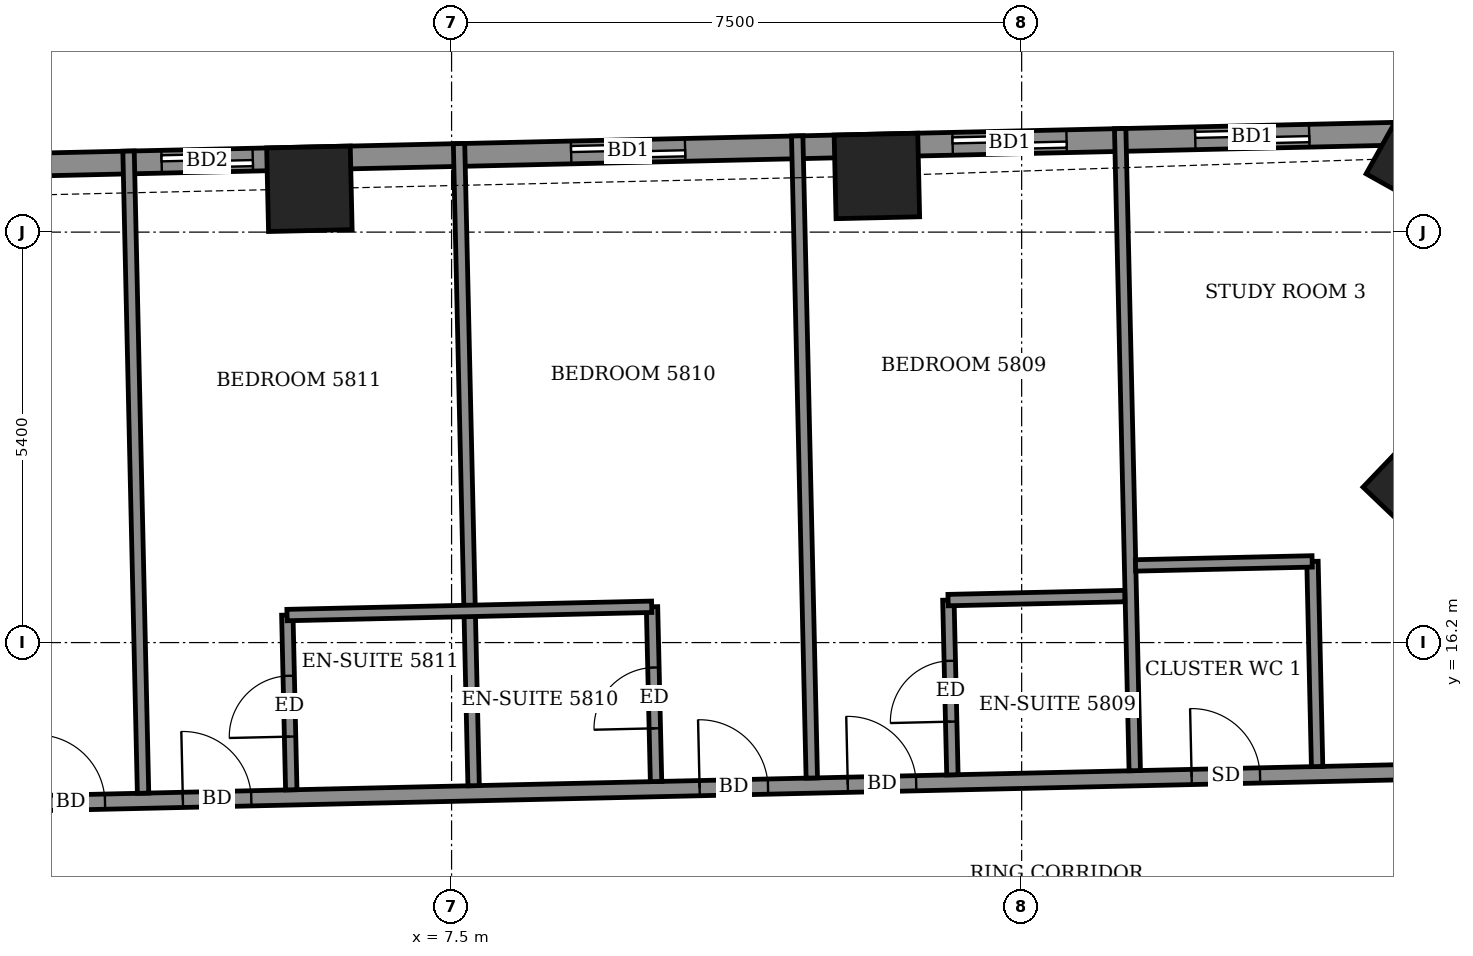
"""IFC4 building model, lengths in metres.
Left out: names, types, materials, properties, quantities, classifications, styles, units other than length and angle.
Written with IfcOpenShell. Run it as: python <this file> out.ifc"""

import sys

from ifc_helpers import new_model, si_unit, direction, frame, frame_2d, origin, origin_2d, place, context, subcontext, project, spatial, rectangle, extrude, element, fill, save


model = new_model("IFC4")
c1 = context("Model", 3, precision=1e-05, world=origin(), true_north=direction((0.0, 1.0)))
c2 = subcontext(c1, "Body", "Model", "MODEL_VIEW")
j1 = project(units=[si_unit("LENGTHUNIT", "METRE"), si_unit("PLANEANGLEUNIT", "RADIAN")], contexts=[c1])
p1 = place(None, origin())
s1 = spatial("IfcSite", under=j1, at=p1, CompositionType="ELEMENT")
p2 = place(p1, origin())
s2 = spatial("IfcBuilding", under=s1, at=p2, CompositionType="ELEMENT")
p3 = place(p2, frame((0.0, 0.0, 231.1)))
s3 = spatial("IfcBuildingStorey", under=s2, at=p3, CompositionType="ELEMENT", Elevation=231.1)
for number, where, z_axis, x_axis in (
    (1, (20.269, 18.262, -0.55), (0.0, 0.0, 1.0), (-0.723, 0.691, 0.0)),
    (2, (20.281, 22.579, -0.55), (0.0, 0.0, 1.0), (-0.873, 0.488, 0.0)),
    (3, (13.095, 22.339, -0.55), (0.0, 0.0, 1.0), (-1.0, -0.023, 0.0)),
    (4, (5.629, 22.17, -0.55), (0.0, 0.0, 1.0), (-1.0, -0.023, 0.0)),
):
    element("IfcColumn", number, at=place(p3, frame(where, z_axis=z_axis, x_axis=x_axis)), inside=s3, PredefinedType="COLUMN", context=c2, shape_type="SweptSolid", body=[
        extrude(rectangle(XDim=1.1, YDim=1.1, at=origin_2d()), origin(), (0.0, 0.0, 1.0), 3.6),
    ])
p4 = place(p3, frame((20.403, 22.905, 0.0), z_axis=(0.0, 0.0, 1.0), x_axis=(-0.99974298964, -0.022670568288, 0.0)))
e5 = element("IfcWall", 5, at=p4, inside=s3, PredefinedType="SOLIDWALL", context=c2, shape_type="SweptSolid", body=[
    extrude(rectangle(XDim=44.509, YDim=0.3, at=frame_2d((22.254, 0.0))), origin(), (0.0, 0.0, 1.0), 2.55),
])
p5 = place(p4, frame((1.62, 0.0, 0.0)))
e6 = element("IfcOpeningElement", 6, at=p5, cuts=e5, PredefinedType="OPENING", context=c2, shape_type="SweptSolid", body=[
    extrude(rectangle(XDim=1.5, YDim=2.4, at=frame_2d((0.75, 1.2))), frame((0.0, 0.16, 0.0), z_axis=(0.0, -1.0, 0.0), x_axis=(1.0, 0.0, 0.0)), (0.0, 0.0, 1.0), 0.32),
])
p6 = place(p4, frame((4.813, 0.0, 0.0)))
e7 = element("IfcOpeningElement", 7, at=p6, cuts=e5, PredefinedType="OPENING", context=c2, shape_type="SweptSolid", body=[
    extrude(rectangle(XDim=1.5, YDim=2.4, at=frame_2d((0.75, 1.2))), frame((0.0, 0.16, 0.0), z_axis=(0.0, -1.0, 0.0), x_axis=(1.0, 0.0, 0.0)), (0.0, 0.0, 1.0), 0.32),
])
p7 = place(p4, frame((9.833, 0.0, 0.0)))
e8 = element("IfcOpeningElement", 8, at=p7, cuts=e5, PredefinedType="OPENING", context=c2, shape_type="SweptSolid", body=[
    extrude(rectangle(XDim=1.5, YDim=2.4, at=frame_2d((0.75, 1.2))), frame((0.0, 0.16, 0.0), z_axis=(0.0, -1.0, 0.0), x_axis=(1.0, 0.0, 0.0)), (0.0, 0.0, 1.0), 0.32),
])
p8 = place(p4, frame((15.522, 0.0, 0.0)))
e9 = element("IfcOpeningElement", 9, at=p8, cuts=e5, PredefinedType="OPENING", context=c2, shape_type="SweptSolid", body=[
    extrude(rectangle(XDim=1.2, YDim=2.4, at=frame_2d((0.6, 1.2))), frame((0.0, 0.16, 0.0), z_axis=(0.0, -1.0, 0.0), x_axis=(1.0, 0.0, 0.0)), (0.0, 0.0, 1.0), 0.32),
])
p9 = place(p4, frame((18.558, 0.0, 0.0)))
e10 = element("IfcOpeningElement", 10, at=p9, cuts=e5, PredefinedType="OPENING", context=c2, shape_type="SweptSolid", body=[
    extrude(rectangle(XDim=1.5, YDim=2.4, at=frame_2d((0.75, 1.2))), frame((0.0, 0.16, 0.0), z_axis=(0.0, -1.0, 0.0), x_axis=(1.0, 0.0, 0.0)), (0.0, 0.0, 1.0), 0.32),
])
p10 = place(p4, frame((23.456, 0.0, 0.0)))
e11 = element("IfcOpeningElement", 11, at=p10, cuts=e5, PredefinedType="OPENING", context=c2, shape_type="SweptSolid", body=[
    extrude(rectangle(XDim=1.5, YDim=2.4, at=frame_2d((0.75, 1.2))), frame((0.0, 0.16, 0.0), z_axis=(0.0, -1.0, 0.0), x_axis=(1.0, 0.0, 0.0)), (0.0, 0.0, 1.0), 0.32),
])
p11 = place(p4, frame((26.89, 0.0, 0.0)))
e12 = element("IfcOpeningElement", 12, at=p11, cuts=e5, PredefinedType="OPENING", context=c2, shape_type="SweptSolid", body=[
    extrude(rectangle(XDim=1.5, YDim=2.4, at=frame_2d((0.75, 1.2))), frame((0.0, 0.16, 0.0), z_axis=(0.0, -1.0, 0.0), x_axis=(1.0, 0.0, 0.0)), (0.0, 0.0, 1.0), 0.32),
])
p12 = place(p4, frame((31.708, 0.0, 0.0)))
e13 = element("IfcOpeningElement", 13, at=p12, cuts=e5, PredefinedType="OPENING", context=c2, shape_type="SweptSolid", body=[
    extrude(rectangle(XDim=1.5, YDim=2.4, at=frame_2d((0.75, 1.2))), frame((0.0, 0.16, 0.0), z_axis=(0.0, -1.0, 0.0), x_axis=(1.0, 0.0, 0.0)), (0.0, 0.0, 1.0), 0.32),
])
p13 = place(p4, frame((35.024, 0.0, 0.0)))
e14 = element("IfcOpeningElement", 14, at=p13, cuts=e5, PredefinedType="OPENING", context=c2, shape_type="SweptSolid", body=[
    extrude(rectangle(XDim=1.5, YDim=2.4, at=frame_2d((0.75, 1.2))), frame((0.0, 0.16, 0.0), z_axis=(0.0, -1.0, 0.0), x_axis=(1.0, 0.0, 0.0)), (0.0, 0.0, 1.0), 0.32),
])
p14 = place(p4, frame((40.173, 0.0, 0.9)))
e15 = element("IfcOpeningElement", 15, at=p14, cuts=e5, PredefinedType="OPENING", context=c2, shape_type="SweptSolid", body=[
    extrude(rectangle(XDim=2.4, YDim=1.5, at=frame_2d((1.2, 0.75))), frame((0.0, 0.16, 0.0), z_axis=(0.0, -1.0, 0.0), x_axis=(1.0, 0.0, 0.0)), (0.0, 0.0, 1.0), 0.32),
])
p15 = place(p3, frame((16.679, 12.918, 0.0), z_axis=(0.0, 0.0, 1.0), x_axis=(0.99974139269, 0.022740882632, 0.0)))
e16 = element("IfcWall", 16, at=p15, inside=s3, PredefinedType="PARTITIONING", context=c2, shape_type="SweptSolid", body=[
    extrude(rectangle(XDim=6.549, YDim=0.2, at=frame_2d((3.274, 0.0))), origin(), (0.0, 0.0, 1.0), 3.05),
])
p16 = place(p15, frame((3.75, 0.0, 0.0)))
e17 = element("IfcOpeningElement", 17, at=p16, cuts=e16, PredefinedType="OPENING", context=c2, shape_type="SweptSolid", body=[
    extrude(rectangle(XDim=1.0, YDim=2.1, at=frame_2d((0.5, 1.05))), frame((0.0, 0.11, 0.0), z_axis=(0.0, -1.0, 0.0), x_axis=(1.0, 0.0, 0.0)), (0.0, 0.0, 1.0), 0.22),
])
p17 = place(p3, frame((-27.652, 13.413, 0.0), z_axis=(0.0, 0.0, 1.0), x_axis=(0.999742610679, 0.022687273792, 0.0)))
e18 = element("IfcWall", 18, at=p17, inside=s3, PredefinedType="PARTITIONING", context=c2, shape_type="SweptSolid", body=[
    extrude(rectangle(XDim=50.857, YDim=0.2, at=frame_2d((25.429, 0.0))), origin(), (0.0, 0.0, 1.0), 3.05),
])
p18 = place(p17, frame((49.179, 0.0, 0.0)))
e19 = element("IfcOpeningElement", 19, at=p18, cuts=e18, PredefinedType="OPENING", context=c2, shape_type="SweptSolid", body=[
    extrude(rectangle(XDim=1.0, YDim=2.1, at=frame_2d((0.5, 1.05))), frame((0.0, 0.11, 0.0), z_axis=(0.0, -1.0, 0.0), x_axis=(1.0, 0.0, 0.0)), (0.0, 0.0, 1.0), 0.22),
])
p19 = place(p17, frame((44.9, 0.0, 0.0)))
e20 = element("IfcOpeningElement", 20, at=p19, cuts=e18, PredefinedType="OPENING", context=c2, shape_type="SweptSolid", body=[
    extrude(rectangle(XDim=0.9, YDim=2.1, at=frame_2d((0.45, 1.05))), frame((0.0, 0.11, 0.0), z_axis=(0.0, -1.0, 0.0), x_axis=(1.0, 0.0, 0.0)), (0.0, 0.0, 1.0), 0.22),
])
p20 = place(p17, frame((40.375, 0.0, 0.0)))
e21 = element("IfcOpeningElement", 21, at=p20, cuts=e18, PredefinedType="OPENING", context=c2, shape_type="SweptSolid", body=[
    extrude(rectangle(XDim=0.9, YDim=2.1, at=frame_2d((0.45, 1.05))), frame((0.0, 0.11, 0.0), z_axis=(0.0, -1.0, 0.0), x_axis=(1.0, 0.0, 0.0)), (0.0, 0.0, 1.0), 0.22),
])
p21 = place(p17, frame((38.425, 0.0, 0.0)))
e22 = element("IfcOpeningElement", 22, at=p21, cuts=e18, PredefinedType="OPENING", context=c2, shape_type="SweptSolid", body=[
    extrude(rectangle(XDim=0.9, YDim=2.1, at=frame_2d((0.45, 1.05))), frame((0.0, 0.11, 0.0), z_axis=(0.0, -1.0, 0.0), x_axis=(1.0, 0.0, 0.0)), (0.0, 0.0, 1.0), 0.22),
])
p22 = place(p17, frame((31.625, 0.0, 0.0)))
e23 = element("IfcOpeningElement", 23, at=p22, cuts=e18, PredefinedType="OPENING", context=c2, shape_type="SweptSolid", body=[
    extrude(rectangle(XDim=0.9, YDim=2.1, at=frame_2d((0.45, 1.05))), frame((0.0, 0.11, 0.0), z_axis=(0.0, -1.0, 0.0), x_axis=(1.0, 0.0, 0.0)), (0.0, 0.0, 1.0), 0.22),
])
p23 = place(p17, frame((29.7, 0.0, 0.0)))
e24 = element("IfcOpeningElement", 24, at=p23, cuts=e18, PredefinedType="OPENING", context=c2, shape_type="SweptSolid", body=[
    extrude(rectangle(XDim=0.9, YDim=2.1, at=frame_2d((0.45, 1.05))), frame((0.0, 0.11, 0.0), z_axis=(0.0, -1.0, 0.0), x_axis=(1.0, 0.0, 0.0)), (0.0, 0.0, 1.0), 0.22),
])
p24 = place(p17, frame((22.95, 0.0, 0.0)))
e25 = element("IfcOpeningElement", 25, at=p24, cuts=e18, PredefinedType="OPENING", context=c2, shape_type="SweptSolid", body=[
    extrude(rectangle(XDim=0.9, YDim=2.1, at=frame_2d((0.45, 1.05))), frame((0.0, 0.11, 0.0), z_axis=(0.0, -1.0, 0.0), x_axis=(1.0, 0.0, 0.0)), (0.0, 0.0, 1.0), 0.22),
])
p25 = place(p17, frame((20.95, 0.0, 0.0)))
e26 = element("IfcOpeningElement", 26, at=p25, cuts=e18, PredefinedType="OPENING", context=c2, shape_type="SweptSolid", body=[
    extrude(rectangle(XDim=0.9, YDim=2.1, at=frame_2d((0.45, 1.05))), frame((0.0, 0.11, 0.0), z_axis=(0.0, -1.0, 0.0), x_axis=(1.0, 0.0, 0.0)), (0.0, 0.0, 1.0), 0.22),
])
p26 = place(p17, frame((14.15, 0.0, 0.0)))
e27 = element("IfcOpeningElement", 27, at=p26, cuts=e18, PredefinedType="OPENING", context=c2, shape_type="SweptSolid", body=[
    extrude(rectangle(XDim=0.9, YDim=2.1, at=frame_2d((0.45, 1.05))), frame((0.0, 0.11, 0.0), z_axis=(0.0, -1.0, 0.0), x_axis=(1.0, 0.0, 0.0)), (0.0, 0.0, 1.0), 0.22),
])
p27 = place(p17, frame((12.2, 0.0, 0.0)))
e28 = element("IfcOpeningElement", 28, at=p27, cuts=e18, PredefinedType="OPENING", context=c2, shape_type="SweptSolid", body=[
    extrude(rectangle(XDim=0.9, YDim=2.1, at=frame_2d((0.45, 1.05))), frame((0.0, 0.11, 0.0), z_axis=(0.0, -1.0, 0.0), x_axis=(1.0, 0.0, 0.0)), (0.0, 0.0, 1.0), 0.22),
])
p28 = place(p17, frame((2.05, 0.0, 0.0)))
e29 = element("IfcOpeningElement", 29, at=p28, cuts=e18, PredefinedType="OPENING", context=c2, shape_type="SweptSolid", body=[
    extrude(rectangle(XDim=1.0, YDim=2.1, at=frame_2d((0.5, 1.05))), frame((0.0, 0.11, 0.0), z_axis=(0.0, -1.0, 0.0), x_axis=(1.0, 0.0, 0.0)), (0.0, 0.0, 1.0), 0.22),
])
p29 = place(p17, frame((7.45, 0.0, 0.0)))
e30 = element("IfcOpeningElement", 30, at=p29, cuts=e18, PredefinedType="OPENING", context=c2, shape_type="SweptSolid", body=[
    extrude(rectangle(XDim=0.9, YDim=2.1, at=frame_2d((0.45, 1.05))), frame((0.0, 0.11, 0.0), z_axis=(0.0, -1.0, 0.0), x_axis=(1.0, 0.0, 0.0)), (0.0, 0.0, 1.0), 0.22),
])
p30 = place(p3, frame((3.441, 14.218, 0.0), z_axis=(0.0, 0.0, 1.0), x_axis=(-0.022593427839, 0.999744735929, 0.0)))
e31 = element("IfcWall", 31, at=p30, inside=s3, PredefinedType="PARTITIONING", context=c2, shape_type="SweptSolid", body=[
    extrude(rectangle(XDim=8.45, YDim=0.15, at=frame_2d((4.225, 0.0))), origin(), (0.0, 0.0, 1.0), 2.5),
])
p31 = place(p3, frame((5.391, 14.263, 0.0), z_axis=(0.0, 0.0, 1.0), x_axis=(-0.022612884682, 0.999744296031, 0.0)))
e32 = element("IfcWall", 32, at=p31, inside=s3, PredefinedType="PARTITIONING", context=c2, shape_type="SweptSolid", body=[
    extrude(rectangle(XDim=2.3, YDim=0.15, at=frame_2d((1.15, 0.0))), origin(), (0.0, 0.0, 1.0), 3.05),
])
p32 = place(p31, frame((0.7, 0.0, 0.0)))
e33 = element("IfcOpeningElement", 33, at=p32, cuts=e32, PredefinedType="OPENING", context=c2, shape_type="SweptSolid", body=[
    extrude(rectangle(XDim=0.8, YDim=2.1, at=frame_2d((0.4, 1.05))), frame((0.0, 0.085, 0.0), z_axis=(0.0, -1.0, 0.0), x_axis=(1.0, 0.0, 0.0)), (0.0, 0.0, 1.0), 0.17),
])
p33 = place(p3, frame((7.79, 14.317, 0.0), z_axis=(0.0, 0.0, 1.0), x_axis=(-0.022737812646, 0.999741462517, 0.0)))
e34 = element("IfcWall", 34, at=p33, inside=s3, PredefinedType="PARTITIONING", context=c2, shape_type="SweptSolid", body=[
    extrude(rectangle(XDim=8.45, YDim=0.15, at=frame_2d((4.225, 0.0))), origin(), (0.0, 0.0, 1.0), 2.5),
])
p34 = place(p3, frame((10.19, 14.372, 0.0), z_axis=(0.0, 0.0, 1.0), x_axis=(-0.023039761813, 0.999734549456, 0.0)))
e35 = element("IfcWall", 35, at=p34, inside=s3, PredefinedType="PARTITIONING", context=c2, shape_type="SweptSolid", body=[
    extrude(rectangle(XDim=2.3, YDim=0.15, at=frame_2d((1.15, 0.0))), origin(), (0.0, 0.0, 1.0), 3.05),
])
p35 = place(p34, frame((0.7, 0.0, 0.0)))
e36 = element("IfcOpeningElement", 36, at=p35, cuts=e35, PredefinedType="OPENING", context=c2, shape_type="SweptSolid", body=[
    extrude(rectangle(XDim=0.8, YDim=2.1, at=frame_2d((0.4, 1.05))), frame((0.0, 0.085, 0.0), z_axis=(0.0, -1.0, 0.0), x_axis=(1.0, 0.0, 0.0)), (0.0, 0.0, 1.0), 0.17),
])
p36 = place(p3, frame((12.239, 14.418, 0.0), z_axis=(0.0, 0.0, 1.0), x_axis=(-0.022708935798, 0.999742118866, 0.0)))
e37 = element("IfcWall", 37, at=p36, inside=s3, PredefinedType="PARTITIONING", context=c2, shape_type="SweptSolid", body=[
    extrude(rectangle(XDim=8.45, YDim=0.15, at=frame_2d((4.225, 0.0))), origin(), (0.0, 0.0, 1.0), 2.5),
])
p37 = place(p3, frame((14.089, 14.46, 0.0), z_axis=(0.0, 0.0, 1.0), x_axis=(-0.023143422514, 0.999732155127, 0.0)))
e38 = element("IfcWall", 38, at=p37, inside=s3, PredefinedType="PARTITIONING", context=c2, shape_type="SweptSolid", body=[
    extrude(rectangle(XDim=2.3, YDim=0.15, at=frame_2d((1.15, 0.0))), origin(), (0.0, 0.0, 1.0), 3.05),
])
p38 = place(p37, frame((0.7, 0.0, 0.0)))
e39 = element("IfcOpeningElement", 39, at=p38, cuts=e38, PredefinedType="OPENING", context=c2, shape_type="SweptSolid", body=[
    extrude(rectangle(XDim=0.8, YDim=2.1, at=frame_2d((0.4, 1.05))), frame((0.0, 0.085, 0.0), z_axis=(0.0, -1.0, 0.0), x_axis=(1.0, 0.0, 0.0)), (0.0, 0.0, 1.0), 0.17),
])
p39 = place(p3, frame((16.488, 14.515, 0.0), z_axis=(0.0, 0.0, 1.0), x_axis=(-0.022740440012, 0.999741402758, 0.0)))
e40 = element("IfcWall", 40, at=p39, inside=s3, PredefinedType="PARTITIONING", context=c2, shape_type="SweptSolid", body=[
    extrude(rectangle(XDim=8.449, YDim=0.15, at=frame_2d((4.225, 0.0))), origin(), (0.0, 0.0, 1.0), 2.55),
])
p40 = place(p3, frame((18.887, 14.569, 0.0), z_axis=(0.0, 0.0, 1.0), x_axis=(-0.02260842146, 0.999744396973, 0.0)))
e41 = element("IfcWall", 41, at=p40, inside=s3, PredefinedType="PARTITIONING", context=c2, shape_type="SweptSolid", body=[
    extrude(rectangle(XDim=2.7, YDim=0.15, at=frame_2d((1.35, 0.0))), origin(), (0.0, 0.0, 1.0), 3.05),
])
p41 = place(p3, frame((5.335, 16.562, 0.0), z_axis=(0.0, 0.0, 1.0), x_axis=(0.999742596585, 0.02268789488, 0.0)))
e42 = element("IfcWall", 42, at=p41, inside=s3, PredefinedType="PARTITIONING", context=c2, shape_type="SweptSolid", body=[
    extrude(rectangle(XDim=4.799, YDim=0.15, at=frame_2d((2.4, 0.0))), origin(), (0.0, 0.0, 1.0), 3.05),
])
p42 = place(p3, frame((14.032, 16.759, 0.0), z_axis=(0.0, 0.0, 1.0), x_axis=(0.999740478815, 0.022781023197, 0.0)))
e43 = element("IfcWall", 43, at=p42, inside=s3, PredefinedType="PARTITIONING", context=c2, shape_type="SweptSolid", body=[
    extrude(rectangle(XDim=2.325, YDim=0.15, at=frame_2d((1.163, 0.0))), origin(), (0.0, 0.0, 1.0), 3.05),
])
p43 = place(p3, frame((16.498, 17.215, 0.0), z_axis=(0.0, 0.0, 1.0), x_axis=(0.999740260747, 0.02279059109, 0.0)))
e44 = element("IfcWall", 44, at=p43, inside=s3, PredefinedType="PARTITIONING", context=c2, shape_type="SweptSolid", body=[
    extrude(rectangle(XDim=2.324, YDim=0.15, at=frame_2d((1.162, 0.0))), origin(), (0.0, 0.0, 1.0), 3.05),
])
p44 = place(p5, origin())
e45 = element("IfcDoor", 45, at=p44, inside=s3, OperationType="SLIDING_TO_LEFT", PredefinedType="DOOR", context=c2, shape_type="SweptSolid", body=[
    extrude(rectangle(XDim=1.5, YDim=2.4, at=frame_2d((0.75, 1.2))), frame((0.0, 0.025, 0.0), z_axis=(0.0, -1.0, 0.0), x_axis=(1.0, 0.0, 0.0)), (0.0, 0.0, 1.0), 0.05),
])
fill(e6, e45)
p45 = place(p6, origin())
e46 = element("IfcDoor", 46, at=p45, inside=s3, OperationType="SLIDING_TO_LEFT", PredefinedType="DOOR", context=c2, shape_type="SweptSolid", body=[
    extrude(rectangle(XDim=1.5, YDim=2.4, at=frame_2d((0.75, 1.2))), frame((0.0, 0.025, 0.0), z_axis=(0.0, -1.0, 0.0), x_axis=(1.0, 0.0, 0.0)), (0.0, 0.0, 1.0), 0.05),
])
fill(e7, e46)
p46 = place(p7, origin())
e47 = element("IfcDoor", 47, at=p46, inside=s3, OperationType="SLIDING_TO_LEFT", PredefinedType="DOOR", context=c2, shape_type="SweptSolid", body=[
    extrude(rectangle(XDim=1.5, YDim=2.4, at=frame_2d((0.75, 1.2))), frame((0.0, 0.025, 0.0), z_axis=(0.0, -1.0, 0.0), x_axis=(1.0, 0.0, 0.0)), (0.0, 0.0, 1.0), 0.05),
])
fill(e8, e47)
p47 = place(p8, origin())
e48 = element("IfcDoor", 48, at=p47, inside=s3, OperationType="SLIDING_TO_LEFT", PredefinedType="DOOR", context=c2, shape_type="SweptSolid", body=[
    extrude(rectangle(XDim=1.2, YDim=2.4, at=frame_2d((0.6, 1.2))), frame((0.0, 0.025, 0.0), z_axis=(0.0, -1.0, 0.0), x_axis=(1.0, 0.0, 0.0)), (0.0, 0.0, 1.0), 0.05),
])
fill(e9, e48)
p48 = place(p19, origin())
e49 = element("IfcDoor", 49, at=p48, inside=s3, OperationType="SINGLE_SWING_RIGHT", PredefinedType="DOOR", context=c2, shape_type="SweptSolid", body=[
    extrude(rectangle(XDim=0.9, YDim=2.1, at=frame_2d((0.45, 1.05))), frame((0.0, 0.025, 0.0), z_axis=(0.0, -1.0, 0.0), x_axis=(1.0, 0.0, 0.0)), (0.0, 0.0, 1.0), 0.05),
])
fill(e20, e49)
p49 = place(p20, origin())
e50 = element("IfcDoor", 50, at=p49, inside=s3, OperationType="SINGLE_SWING_LEFT", PredefinedType="DOOR", context=c2, shape_type="SweptSolid", body=[
    extrude(rectangle(XDim=0.9, YDim=2.1, at=frame_2d((0.45, 1.05))), frame((0.0, 0.025, 0.0), z_axis=(0.0, -1.0, 0.0), x_axis=(1.0, 0.0, 0.0)), (0.0, 0.0, 1.0), 0.05),
])
fill(e21, e50)
p50 = place(p38, origin())
e51 = element("IfcDoor", 51, at=p50, inside=s3, OperationType="SINGLE_SWING_LEFT", PredefinedType="DOOR", context=c2, shape_type="SweptSolid", body=[
    extrude(rectangle(XDim=0.8, YDim=2.1, at=frame_2d((0.4, 1.05))), frame((0.0, 0.025, 0.0), z_axis=(0.0, -1.0, 0.0), x_axis=(1.0, 0.0, 0.0)), (0.0, 0.0, 1.0), 0.05),
])
fill(e39, e51)
p51 = place(p21, origin())
e52 = element("IfcDoor", 52, at=p51, inside=s3, OperationType="SINGLE_SWING_RIGHT", PredefinedType="DOOR", context=c2, shape_type="SweptSolid", body=[
    extrude(rectangle(XDim=0.9, YDim=2.1, at=frame_2d((0.45, 1.05))), frame((0.0, 0.025, 0.0), z_axis=(0.0, -1.0, 0.0), x_axis=(1.0, 0.0, 0.0)), (0.0, 0.0, 1.0), 0.05),
])
fill(e22, e52)
p52 = place(p35, origin())
e53 = element("IfcDoor", 53, at=p52, inside=s3, OperationType="SINGLE_SWING_RIGHT", PredefinedType="DOOR", context=c2, shape_type="SweptSolid", body=[
    extrude(rectangle(XDim=0.8, YDim=2.1, at=frame_2d((0.4, 1.05))), frame((0.0, 0.025, 0.0), z_axis=(0.0, -1.0, 0.0), x_axis=(1.0, 0.0, 0.0)), (0.0, 0.0, 1.0), 0.05),
])
fill(e36, e53)
p53 = place(p22, origin())
e54 = element("IfcDoor", 54, at=p53, inside=s3, OperationType="SINGLE_SWING_LEFT", PredefinedType="DOOR", context=c2, shape_type="SweptSolid", body=[
    extrude(rectangle(XDim=0.9, YDim=2.1, at=frame_2d((0.45, 1.05))), frame((0.0, 0.025, 0.0), z_axis=(0.0, -1.0, 0.0), x_axis=(1.0, 0.0, 0.0)), (0.0, 0.0, 1.0), 0.05),
])
fill(e23, e54)
p54 = place(p32, origin())
e55 = element("IfcDoor", 55, at=p54, inside=s3, OperationType="SINGLE_SWING_LEFT", PredefinedType="DOOR", context=c2, shape_type="SweptSolid", body=[
    extrude(rectangle(XDim=0.8, YDim=2.1, at=frame_2d((0.4, 1.05))), frame((0.0, 0.025, 0.0), z_axis=(0.0, -1.0, 0.0), x_axis=(1.0, 0.0, 0.0)), (0.0, 0.0, 1.0), 0.05),
])
fill(e33, e55)
p55 = place(p23, origin())
e56 = element("IfcDoor", 56, at=p55, inside=s3, OperationType="SINGLE_SWING_RIGHT", PredefinedType="DOOR", context=c2, shape_type="SweptSolid", body=[
    extrude(rectangle(XDim=0.9, YDim=2.1, at=frame_2d((0.45, 1.05))), frame((0.0, 0.025, 0.0), z_axis=(0.0, -1.0, 0.0), x_axis=(1.0, 0.0, 0.0)), (0.0, 0.0, 1.0), 0.05),
])
fill(e24, e56)
save(model, sys.argv[1])
